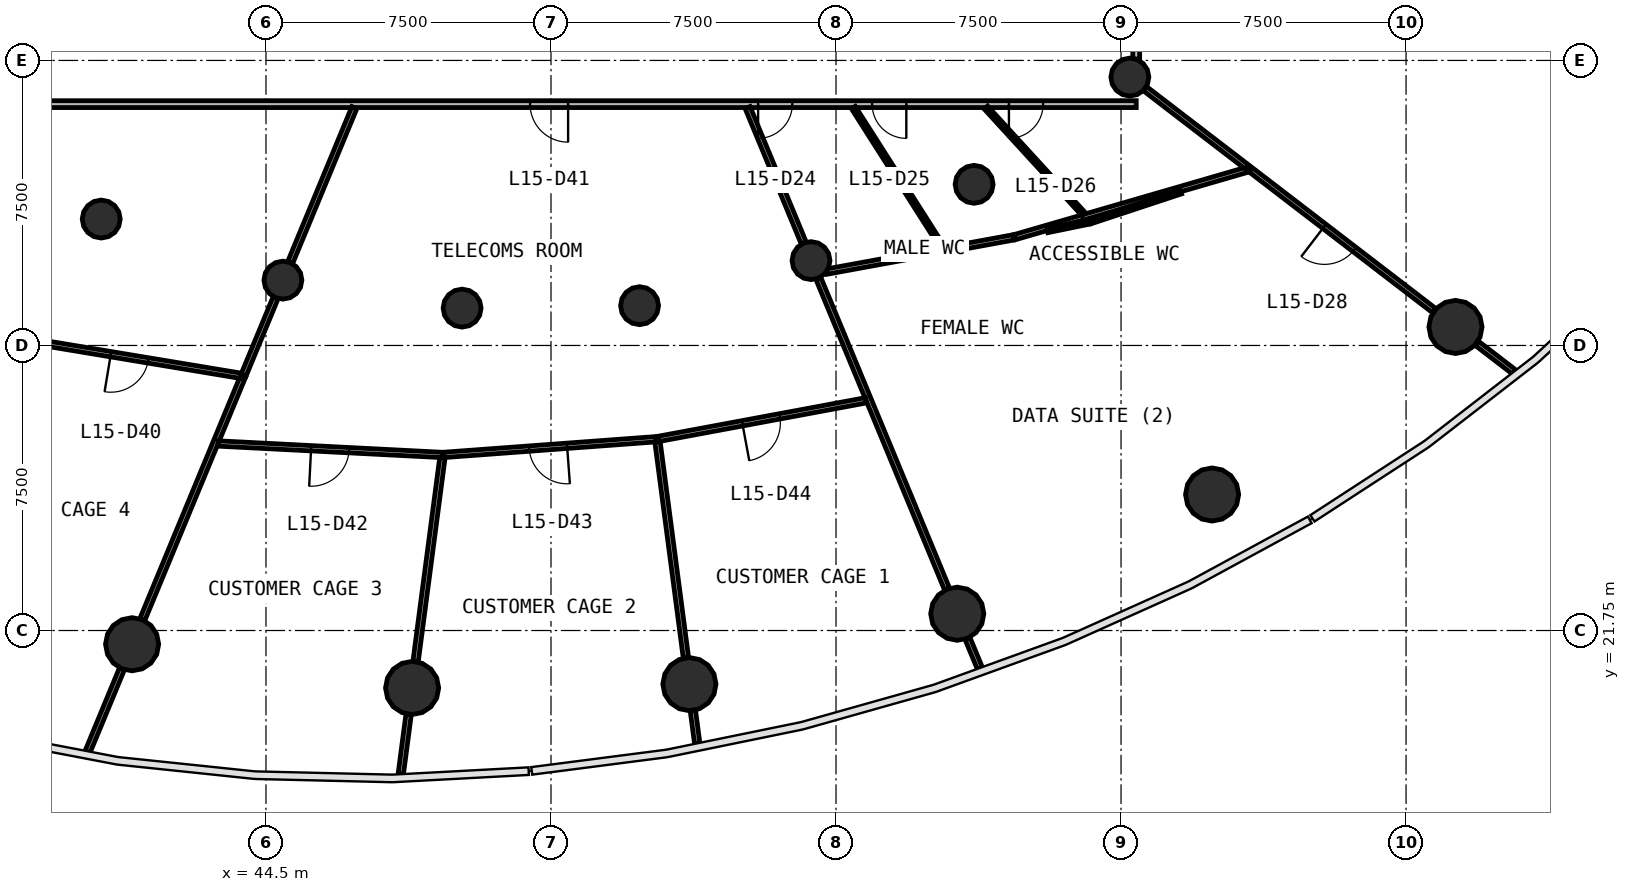
"""IFC4 building model, lengths in metres.
Left out: names, types, materials, properties, quantities, classifications, styles, units other than length and angle.
Written with IfcOpenShell. Run it as: python <this file> out.ifc"""

import sys

from ifc_helpers import new_model, si_unit, direction, frame, frame_2d, origin, origin_2d, place, context, subcontext, project, spatial, rectangle, circle, extrude, source, transform, mapped, element, fill, save


model = new_model("IFC4")
c1 = context("Model", 3, precision=1e-05, world=origin(), true_north=direction((0.0, 1.0)))
c2 = subcontext(c1, "Body", "Model", "MODEL_VIEW")
j1 = project(units=[si_unit("LENGTHUNIT", "METRE"), si_unit("PLANEANGLEUNIT", "RADIAN")], contexts=[c1])
p1 = place(None, origin())
s1 = spatial("IfcSite", under=j1, at=p1, CompositionType="ELEMENT")
p2 = place(p1, origin())
s2 = spatial("IfcBuilding", under=s1, at=p2, CompositionType="ELEMENT")
p3 = place(p2, frame((0.0, 0.0, 66.6)))
s3 = spatial("IfcBuildingStorey", under=s2, at=p3, CompositionType="ELEMENT", Elevation=66.6)
m1 = source(origin(), c2, "Body", "SweptSolid", [
    extrude(circle(Radius=0.7, at=origin_2d()), origin(), (0.0, 0.0, 1.0), 4.4),
])
for number, where, z_axis, x_axis in (
    (1, (40.977, 21.389, 0.0), (0.0, 0.0, 1.0), (1.0, 0.0, 0.0)),
    (2, (48.345, 20.239, 0.0), (0.0, 0.0, 1.0), (1.0, 0.0, 0.0)),
    (3, (55.642, 20.339, 0.0), (0.0, 0.0, 1.0), (1.0, 0.0, 0.0)),
    (4, (62.69, 22.191, 0.0), (0.0, 0.0, 1.0), (1.0, 0.0, 0.0)),
    (5, (69.396, 25.328, 0.0), (0.0, 0.0, 1.0), (1.0, 0.0, 0.0)),
    (6, (75.801, 29.737, 0.0), (0.0, 0.0, 1.0), (1.0, 0.0, 0.0)),
):
    element("IfcColumn", number, at=place(p3, frame(where, z_axis=z_axis, x_axis=x_axis)), inside=s3, PredefinedType="COLUMN", context=c2, shape_type="MappedRepresentation", body=[
        mapped(m1, transform((0.0, 0.0, 0.0), scale=1.0)),
    ])
m2 = source(origin(), c2, "Body", "SweptSolid", [
    extrude(circle(Radius=0.5, at=origin_2d()), origin(), (0.0, 0.0, 1.0), 4.4),
])
for number, where, z_axis, x_axis in (
    (7, (40.165, 32.576, 0.0), (0.0, 0.0, 1.0), (1.0, 0.0, 0.0)),
    (8, (44.945, 30.969, 0.0), (0.0, 0.0, 1.0), (1.0, 0.0, 0.0)),
    (9, (49.661, 30.233, 0.0), (0.0, 0.0, 1.0), (1.0, 0.0, 0.0)),
    (10, (54.331, 30.297, 0.0), (0.0, 0.0, 1.0), (1.0, 0.0, 0.0)),
    (11, (58.842, 31.482, 0.0), (0.0, 0.0, 1.0), (1.0, 0.0, 0.0)),
    (12, (63.134, 33.49, 0.0), (0.0, 0.0, 1.0), (1.0, 0.0, 0.0)),
    (13, (67.232, 36.312, 0.0), (0.0, 0.0, 1.0), (1.0, 0.0, 0.0)),
):
    element("IfcColumn", number, at=place(p3, frame(where, z_axis=z_axis, x_axis=x_axis)), inside=s3, PredefinedType="COLUMN", context=c2, shape_type="MappedRepresentation", body=[
        mapped(m2, transform((0.0, 0.0, 0.0), scale=1.0)),
    ])
p4 = place(p3, frame((67.4, 35.6, 0.0), z_axis=(0.0, 0.0, 1.0), x_axis=(-1.0, 0.0, 0.0)))
e14 = element("IfcWall", 14, at=p4, inside=s3, PredefinedType="PARTITIONING", context=c2, shape_type="SweptSolid", body=[
    extrude(rectangle(XDim=30.8, YDim=0.18, at=frame_2d((15.4, 0.0))), origin(), (0.0, 0.0, 1.0), 3.05),
])
p5 = place(p4, frame((9.05, 0.0, 0.0)))
e15 = element("IfcOpeningElement", 15, at=p5, cuts=e14, PredefinedType="OPENING", context=c2, shape_type="SweptSolid", body=[
    extrude(rectangle(XDim=0.9, YDim=2.1, at=frame_2d((0.45, 1.05))), frame((0.0, 0.1, 0.0), z_axis=(0.0, -1.0, 0.0), x_axis=(1.0, 0.0, 0.0)), (0.0, 0.0, 1.0), 0.2),
])
p6 = place(p4, frame((6.05, 0.0, 0.0)))
e16 = element("IfcOpeningElement", 16, at=p6, cuts=e14, PredefinedType="OPENING", context=c2, shape_type="SweptSolid", body=[
    extrude(rectangle(XDim=0.9, YDim=2.1, at=frame_2d((0.45, 1.05))), frame((0.0, 0.1, 0.0), z_axis=(0.0, -1.0, 0.0), x_axis=(1.0, 0.0, 0.0)), (0.0, 0.0, 1.0), 0.2),
])
p7 = place(p4, frame((2.45, 0.0, 0.0)))
e17 = element("IfcOpeningElement", 17, at=p7, cuts=e14, PredefinedType="OPENING", context=c2, shape_type="SweptSolid", body=[
    extrude(rectangle(XDim=0.9, YDim=2.1, at=frame_2d((0.45, 1.05))), frame((0.0, 0.1, 0.0), z_axis=(0.0, -1.0, 0.0), x_axis=(1.0, 0.0, 0.0)), (0.0, 0.0, 1.0), 0.2),
])
p8 = place(p4, frame((14.95, 0.0, 0.0)))
e18 = element("IfcOpeningElement", 18, at=p8, cuts=e14, PredefinedType="OPENING", context=c2, shape_type="SweptSolid", body=[
    extrude(rectangle(XDim=1.0, YDim=2.1, at=frame_2d((0.5, 1.05))), frame((0.0, 0.1, 0.0), z_axis=(0.0, -1.0, 0.0), x_axis=(1.0, 0.0, 0.0)), (0.0, 0.0, 1.0), 0.2),
])
p9 = place(p3, frame((67.4, 60.37, 0.0), z_axis=(0.0, 0.0, 1.0), x_axis=(0.0, -1.0, 0.0)))
e19 = element("IfcWall", 19, at=p9, inside=s3, PredefinedType="PARTITIONING", context=c2, shape_type="SweptSolid", body=[
    extrude(rectangle(XDim=23.583, YDim=0.18, at=frame_2d((11.791, 0.0))), origin(), (0.0, 0.0, 1.0), 3.05),
])
p10 = place(p9, frame((11.333, 0.0, 0.0)))
e20 = element("IfcOpeningElement", 20, at=p10, cuts=e19, PredefinedType="OPENING", context=c2, shape_type="SweptSolid", body=[
    extrude(rectangle(XDim=1.0, YDim=2.1, at=frame_2d((0.5, 1.05))), frame((0.0, 0.1, 0.0), z_axis=(0.0, -1.0, 0.0), x_axis=(1.0, 0.0, 0.0)), (0.0, 0.0, 1.0), 0.2),
])
p11 = place(p9, frame((4.532, 0.0, 0.0)))
e21 = element("IfcOpeningElement", 21, at=p11, cuts=e19, PredefinedType="OPENING", context=c2, shape_type="SweptSolid", body=[
    extrude(rectangle(XDim=1.0, YDim=2.1, at=frame_2d((0.5, 1.05))), frame((0.0, 0.1, 0.0), z_axis=(0.0, -1.0, 0.0), x_axis=(1.0, 0.0, 0.0)), (0.0, 0.0, 1.0), 0.2),
])
p12 = place(p3, frame((59.035, 31.016, 0.0), z_axis=(0.0, 0.0, 1.0), x_axis=(0.382692208588, -0.923875897232, 0.0)))
e22 = element("IfcWall", 22, at=p12, inside=s3, PredefinedType="PARTITIONING", context=c2, shape_type="SweptSolid", body=[
    extrude(rectangle(XDim=8.846, YDim=0.14, at=frame_2d((4.423, 0.0))), origin(), (0.0, 0.0, 1.0), 3.05),
])
p13 = place(p3, frame((43.899, 28.442, 0.0), z_axis=(0.0, 0.0, 1.0), x_axis=(-0.382643242671, -0.923896178603, 0.0)))
e23 = element("IfcWall", 23, at=p13, inside=s3, PredefinedType="PARTITIONING", context=c2, shape_type="SweptSolid", body=[
    extrude(rectangle(XDim=6.93, YDim=0.14, at=frame_2d((3.465, 0.0))), origin(), (0.0, 0.0, 1.0), 3.05),
])
p14 = place(p3, frame((64.201, 32.1, 0.0), z_axis=(0.0, 0.0, 1.0), x_axis=(0.96039403273, 0.278645477079, 0.0)))
e24 = element("IfcWall", 24, at=p14, inside=s3, PredefinedType="PARTITIONING", context=c2, shape_type="SweptSolid", body=[
    extrude(rectangle(XDim=6.438, YDim=0.14, at=frame_2d((3.219, 0.0))), origin(), (0.0, 0.0, 1.0), 3.05),
])
p15 = place(p3, frame((43.828, 28.454, 0.0), z_axis=(0.0, 0.0, 1.0), x_axis=(-0.986499590072, 0.163763728546, 0.0)))
e25 = element("IfcWall", 25, at=p15, inside=s3, PredefinedType="PARTITIONING", context=c2, shape_type="SweptSolid", body=[
    extrude(rectangle(XDim=6.108, YDim=0.14, at=frame_2d((3.054, 0.0))), origin(), (0.0, 0.0, 1.0), 3.05),
])
p16 = place(p15, frame((2.458, 0.0, 0.0)))
e26 = element("IfcOpeningElement", 26, at=p16, cuts=e25, PredefinedType="OPENING", context=c2, shape_type="SweptSolid", body=[
    extrude(rectangle(XDim=1.0, YDim=2.1, at=frame_2d((0.5, 1.05))), frame((0.0, 0.08, 0.0), z_axis=(0.0, -1.0, 0.0), x_axis=(1.0, 0.0, 0.0)), (0.0, 0.0, 1.0), 0.16),
])
p17 = place(p3, frame((75.242, 30.166, 0.0), z_axis=(0.0, 0.0, 1.0), x_axis=(-0.793369627486, 0.608740202535, 0.0)))
e27 = element("IfcWall", 27, at=p17, inside=s3, PredefinedType="PARTITIONING", context=c2, shape_type="SweptSolid", body=[
    extrude(rectangle(XDim=6.093, YDim=0.14, at=frame_2d((3.047, 0.0))), origin(), (0.0, 0.0, 1.0), 3.05),
])
p18 = place(p17, frame((2.643, 0.0, 0.0)))
e28 = element("IfcOpeningElement", 28, at=p18, cuts=e27, PredefinedType="OPENING", context=c2, shape_type="SweptSolid", body=[
    extrude(rectangle(XDim=1.0, YDim=2.1, at=frame_2d((0.5, 1.05))), frame((0.0, 0.08, 0.0), z_axis=(0.0, -1.0, 0.0), x_axis=(1.0, 0.0, 0.0)), (0.0, 0.0, 1.0), 0.16),
])
p19 = place(p3, frame((49.152, 26.368, 0.0), z_axis=(0.0, 0.0, 1.0), x_axis=(-0.998693229409, 0.051106100745, 0.0)))
e29 = element("IfcWall", 29, at=p19, inside=s3, PredefinedType="PARTITIONING", context=c2, shape_type="SweptSolid", body=[
    extrude(rectangle(XDim=5.919, YDim=0.14, at=frame_2d((2.959, 0.0))), origin(), (0.0, 0.0, 1.0), 3.05),
])
p20 = place(p19, frame((2.469, 0.0, 0.0)))
e30 = element("IfcOpeningElement", 30, at=p20, cuts=e29, PredefinedType="OPENING", context=c2, shape_type="SweptSolid", body=[
    extrude(rectangle(XDim=1.0, YDim=2.1, at=frame_2d((0.5, 1.05))), frame((0.0, 0.08, 0.0), z_axis=(0.0, -1.0, 0.0), x_axis=(1.0, 0.0, 0.0)), (0.0, 0.0, 1.0), 0.16),
])
p21 = place(p3, frame((54.793, 26.785, 0.0), z_axis=(0.0, 0.0, 1.0), x_axis=(0.130536206542, -0.991443542912, 0.0)))
e31 = element("IfcWall", 31, at=p21, inside=s3, PredefinedType="PARTITIONING", context=c2, shape_type="SweptSolid", body=[
    extrude(rectangle(XDim=5.798, YDim=0.14, at=frame_2d((2.899, 0.0))), origin(), (0.0, 0.0, 1.0), 3.05),
])
p22 = place(p3, frame((60.288, 27.807, 0.0), z_axis=(0.0, 0.0, 1.0), x_axis=(-0.983131702219, -0.182899032506, 0.0)))
e32 = element("IfcWall", 32, at=p22, inside=s3, PredefinedType="PARTITIONING", context=c2, shape_type="SweptSolid", body=[
    extrude(rectangle(XDim=5.56, YDim=0.14, at=frame_2d((2.78, 0.0))), origin(), (0.0, 0.0, 1.0), 3.05),
])
p23 = place(p22, frame((2.31, 0.0, 0.0)))
e33 = element("IfcOpeningElement", 33, at=p23, cuts=e32, PredefinedType="OPENING", context=c2, shape_type="SweptSolid", body=[
    extrude(rectangle(XDim=1.0, YDim=2.1, at=frame_2d((0.5, 1.05))), frame((0.0, 0.08, 0.0), z_axis=(0.0, -1.0, 0.0), x_axis=(1.0, 0.0, 0.0)), (0.0, 0.0, 1.0), 0.16),
])
p24 = place(p3, frame((54.763, 26.783, 0.0), z_axis=(0.0, 0.0, 1.0), x_axis=(-0.997281900443, -0.073680465852, 0.0)))
e34 = element("IfcWall", 34, at=p24, inside=s3, PredefinedType="PARTITIONING", context=c2, shape_type="SweptSolid", body=[
    extrude(rectangle(XDim=5.596, YDim=0.14, at=frame_2d((2.798, 0.0))), origin(), (0.0, 0.0, 1.0), 3.05),
])
p25 = place(p24, frame((2.346, 0.0, 0.0)))
e35 = element("IfcOpeningElement", 35, at=p25, cuts=e34, PredefinedType="OPENING", context=c2, shape_type="SweptSolid", body=[
    extrude(rectangle(XDim=1.0, YDim=2.1, at=frame_2d((0.5, 1.05))), frame((0.0, 0.08, 0.0), z_axis=(0.0, -1.0, 0.0), x_axis=(1.0, 0.0, 0.0)), (0.0, 0.0, 1.0), 0.16),
])
p26 = place(p3, frame((49.143, 26.299, 0.0), z_axis=(0.0, 0.0, 1.0), x_axis=(-0.130549097007, -0.991441845632, 0.0)))
e36 = element("IfcWall", 36, at=p26, inside=s3, PredefinedType="PARTITIONING", context=c2, shape_type="SweptSolid", body=[
    extrude(rectangle(XDim=5.408, YDim=0.14, at=frame_2d((2.704, 0.0))), origin(), (0.0, 0.0, 1.0), 3.05),
])
p27 = place(p3, frame((59.255, 31.194, 0.0), z_axis=(0.0, 0.0, 1.0), x_axis=(0.983629077345, 0.180204989389, 0.0)))
e37 = element("IfcWall", 37, at=p27, inside=s3, PredefinedType="PARTITIONING", context=c2, shape_type="SweptSolid", body=[
    extrude(rectangle(XDim=4.998, YDim=0.14, at=frame_2d((2.499, 0.0))), origin(), (0.0, 0.0, 1.0), 3.05),
])
p28 = place(p3, frame((46.826, 35.51, 0.0), z_axis=(0.0, 0.0, 1.0), x_axis=(-0.382672831764, -0.923883923353, 0.0)))
e38 = element("IfcWall", 38, at=p28, inside=s3, PredefinedType="PARTITIONING", context=c2, shape_type="SweptSolid", body=[
    extrude(rectangle(XDim=4.41, YDim=0.14, at=frame_2d((2.205, 0.0))), origin(), (0.0, 0.0, 1.0), 3.05),
])
p29 = place(p3, frame((44.752, 30.502, 0.0), z_axis=(0.0, 0.0, 1.0), x_axis=(-0.38265237095, -0.923892397959, 0.0)))
e39 = element("IfcWall", 39, at=p29, inside=s3, PredefinedType="PARTITIONING", context=c2, shape_type="SweptSolid", body=[
    extrude(rectangle(XDim=2.2, YDim=0.14, at=frame_2d((1.1, 0.0))), origin(), (0.0, 0.0, 1.0), 3.05),
])
p30 = place(p3, frame((57.174, 35.51, 0.0), z_axis=(0.0, 0.0, 1.0), x_axis=(0.382644558062, -0.923895633817, 0.0)))
e40 = element("IfcWall", 40, at=p30, inside=s3, PredefinedType="PARTITIONING", context=c2, shape_type="SweptSolid", body=[
    extrude(rectangle(XDim=3.854, YDim=0.14, at=frame_2d((1.927, 0.0))), origin(), (0.0, 0.0, 1.0), 3.05),
])
p31 = place(p3, frame((67.633, 36.005, 0.0), z_axis=(0.0, 0.0, 1.0), x_axis=(0.793340144607, -0.608778625574, 0.0)))
e41 = element("IfcWall", 41, at=p31, inside=s3, PredefinedType="PARTITIONING", context=c2, shape_type="SweptSolid", body=[
    extrude(rectangle(XDim=3.381, YDim=0.14, at=frame_2d((1.69, 0.0))), origin(), (0.0, 0.0, 1.0), 3.05),
])
p32 = place(p3, frame((39.804, 18.557, 0.0), z_axis=(0.0, 0.0, 1.0), x_axis=(0.382726450362, 0.9238617127, 0.0)))
e42 = element("IfcWall", 42, at=p32, inside=s3, PredefinedType="PARTITIONING", context=c2, shape_type="SweptSolid", body=[
    extrude(rectangle(XDim=2.36, YDim=0.14, at=frame_2d((1.18, 0.0))), origin(), (0.0, 0.0, 1.0), 3.05),
])
p33 = place(p3, frame((48.253, 19.54, 0.0), z_axis=(0.0, 0.0, 1.0), x_axis=(-0.130454512571, -0.991454295543, 0.0)))
e43 = element("IfcWall", 43, at=p33, inside=s3, PredefinedType="PARTITIONING", context=c2, shape_type="SweptSolid", body=[
    extrude(rectangle(XDim=1.581, YDim=0.14, at=frame_2d((0.791, 0.0))), origin(), (0.0, 0.0, 1.0), 3.05),
])
p34 = place(p3, frame((76.359, 29.309, 0.0), z_axis=(0.0, 0.0, 1.0), x_axis=(0.793287286722, -0.608847502028, 0.0)))
e44 = element("IfcWall", 44, at=p34, inside=s3, PredefinedType="PARTITIONING", context=c2, shape_type="SweptSolid", body=[
    extrude(rectangle(XDim=1.244, YDim=0.14, at=frame_2d((0.622, 0.0))), origin(), (0.0, 0.0, 1.0), 3.05),
])
p35 = place(p3, frame((55.734, 19.64, 0.0), z_axis=(0.0, 0.0, 1.0), x_axis=(0.130418622478, -0.991459017262, 0.0)))
e45 = element("IfcWall", 45, at=p35, inside=s3, PredefinedType="PARTITIONING", context=c2, shape_type="SweptSolid", body=[
    extrude(rectangle(XDim=0.88, YDim=0.14, at=frame_2d((0.44, 0.0))), origin(), (0.0, 0.0, 1.0), 3.05),
])
p36 = place(p3, frame((62.96, 21.54, 0.0), z_axis=(0.0, 0.0, 1.0), x_axis=(0.382660776335, -0.923888916621, 0.0)))
e46 = element("IfcWall", 46, at=p36, inside=s3, PredefinedType="PARTITIONING", context=c2, shape_type="SweptSolid", body=[
    extrude(rectangle(XDim=0.861, YDim=0.14, at=frame_2d((0.43, 0.0))), origin(), (0.0, 0.0, 1.0), 3.05),
])
p37 = place(p3, frame((59.957, 35.51, 0.0), z_axis=(0.0, 0.0, 1.0), x_axis=(0.537309105997, -0.843385395067, 0.0)))
e47 = element("IfcWall", 47, at=p37, inside=s3, PredefinedType="PARTITIONING", context=c2, shape_type="SweptSolid", body=[
    extrude(rectangle(XDim=4.371, YDim=0.12, at=frame_2d((2.186, 0.0))), origin(), (0.0, 0.0, 1.0), 3.05),
])
p38 = place(p3, frame((66.195, 32.51, 0.0), z_axis=(0.0, 0.0, 1.0), x_axis=(0.949518091393, 0.313712279195, 0.0)))
e48 = element("IfcWall", 48, at=p38, inside=s3, PredefinedType="PARTITIONING", context=c2, shape_type="SweptSolid", body=[
    extrude(rectangle(XDim=2.505, YDim=0.12, at=frame_2d((1.252, 0.0))), origin(), (0.0, 0.0, 1.0), 3.05),
])
p39 = place(p3, frame((63.445, 35.51, 0.0), z_axis=(0.0, 0.0, 1.0), x_axis=(0.675588275617, -0.737279107156, 0.0)))
e49 = element("IfcWall", 49, at=p39, inside=s3, PredefinedType="PARTITIONING", context=c2, shape_type="SweptSolid", body=[
    extrude(rectangle(XDim=3.811, YDim=0.12, at=frame_2d((1.906, 0.0))), origin(), (0.0, 0.0, 1.0), 3.05),
])
p40 = place(p3, frame((65.062, 32.277, 0.0), z_axis=(0.0, 0.0, 1.0), x_axis=(0.979498592314, 0.201451005592, 0.0)))
e50 = element("IfcWall", 50, at=p40, inside=s3, PredefinedType="PARTITIONING", context=c2, shape_type="SweptSolid", body=[
    extrude(rectangle(XDim=1.126, YDim=0.12, at=frame_2d((0.563, 0.0))), origin(), (0.0, 0.0, 1.0), 3.05),
])
m3 = source(origin(), c2, "Body", "SweptSolid", [
    extrude(rectangle(XDim=0.9, YDim=2.1, at=frame_2d((0.45, 1.05))), frame((0.0, 0.025, 0.0), z_axis=(0.0, -1.0, 0.0), x_axis=(1.0, 0.0, 0.0)), (0.0, 0.0, 1.0), 0.05),
])
p41 = place(p5, origin())
e51 = element("IfcDoor", 51, at=p41, inside=s3, OperationType="SINGLE_SWING_RIGHT", PredefinedType="DOOR", context=c2, shape_type="MappedRepresentation", body=[
    mapped(m3, transform((0.0, 0.0, 0.0), scale=1.0)),
])
fill(e15, e51)
p42 = place(p6, origin())
e52 = element("IfcDoor", 52, at=p42, inside=s3, OperationType="SINGLE_SWING_LEFT", PredefinedType="DOOR", context=c2, shape_type="MappedRepresentation", body=[
    mapped(m3, transform((0.0, 0.0, 0.0), scale=1.0)),
])
fill(e16, e52)
p43 = place(p7, origin())
e53 = element("IfcDoor", 53, at=p43, inside=s3, OperationType="SINGLE_SWING_RIGHT", PredefinedType="DOOR", context=c2, shape_type="MappedRepresentation", body=[
    mapped(m3, transform((0.0, 0.0, 0.0), scale=1.0)),
])
fill(e17, e53)
m4 = source(origin(), c2, "Body", "SweptSolid", [
    extrude(rectangle(XDim=1.0, YDim=2.1, at=frame_2d((0.5, 1.05))), frame((0.0, 0.025, 0.0), z_axis=(0.0, -1.0, 0.0), x_axis=(1.0, 0.0, 0.0)), (0.0, 0.0, 1.0), 0.05),
])
p44 = place(p18, origin())
e54 = element("IfcDoor", 54, at=p44, inside=s3, OperationType="SINGLE_SWING_RIGHT", PredefinedType="DOOR", context=c2, shape_type="MappedRepresentation", body=[
    mapped(m4, transform((0.0, 0.0, 0.0), scale=1.0)),
])
fill(e28, e54)
p45 = place(p16, origin())
e55 = element("IfcDoor", 55, at=p45, inside=s3, OperationType="SINGLE_SWING_RIGHT", PredefinedType="DOOR", context=c2, shape_type="MappedRepresentation", body=[
    mapped(m4, transform((0.0, 0.0, 0.0), scale=1.0)),
])
fill(e26, e55)
p46 = place(p8, origin())
e56 = element("IfcDoor", 56, at=p46, inside=s3, OperationType="SINGLE_SWING_LEFT", PredefinedType="DOOR", context=c2, shape_type="MappedRepresentation", body=[
    mapped(m4, transform((0.0, 0.0, 0.0), scale=1.0)),
])
fill(e18, e56)
p47 = place(p20, origin())
e57 = element("IfcDoor", 57, at=p47, inside=s3, OperationType="SINGLE_SWING_RIGHT", PredefinedType="DOOR", context=c2, shape_type="MappedRepresentation", body=[
    mapped(m4, transform((0.0, 0.0, 0.0), scale=1.0)),
])
fill(e30, e57)
p48 = place(p25, origin())
e58 = element("IfcDoor", 58, at=p48, inside=s3, OperationType="SINGLE_SWING_LEFT", PredefinedType="DOOR", context=c2, shape_type="MappedRepresentation", body=[
    mapped(m4, transform((0.0, 0.0, 0.0), scale=1.0)),
])
fill(e35, e58)
p49 = place(p23, origin())
e59 = element("IfcDoor", 59, at=p49, inside=s3, OperationType="SINGLE_SWING_RIGHT", PredefinedType="DOOR", context=c2, shape_type="MappedRepresentation", body=[
    mapped(m4, transform((0.0, 0.0, 0.0), scale=1.0)),
])
fill(e33, e59)
save(model, sys.argv[1])
